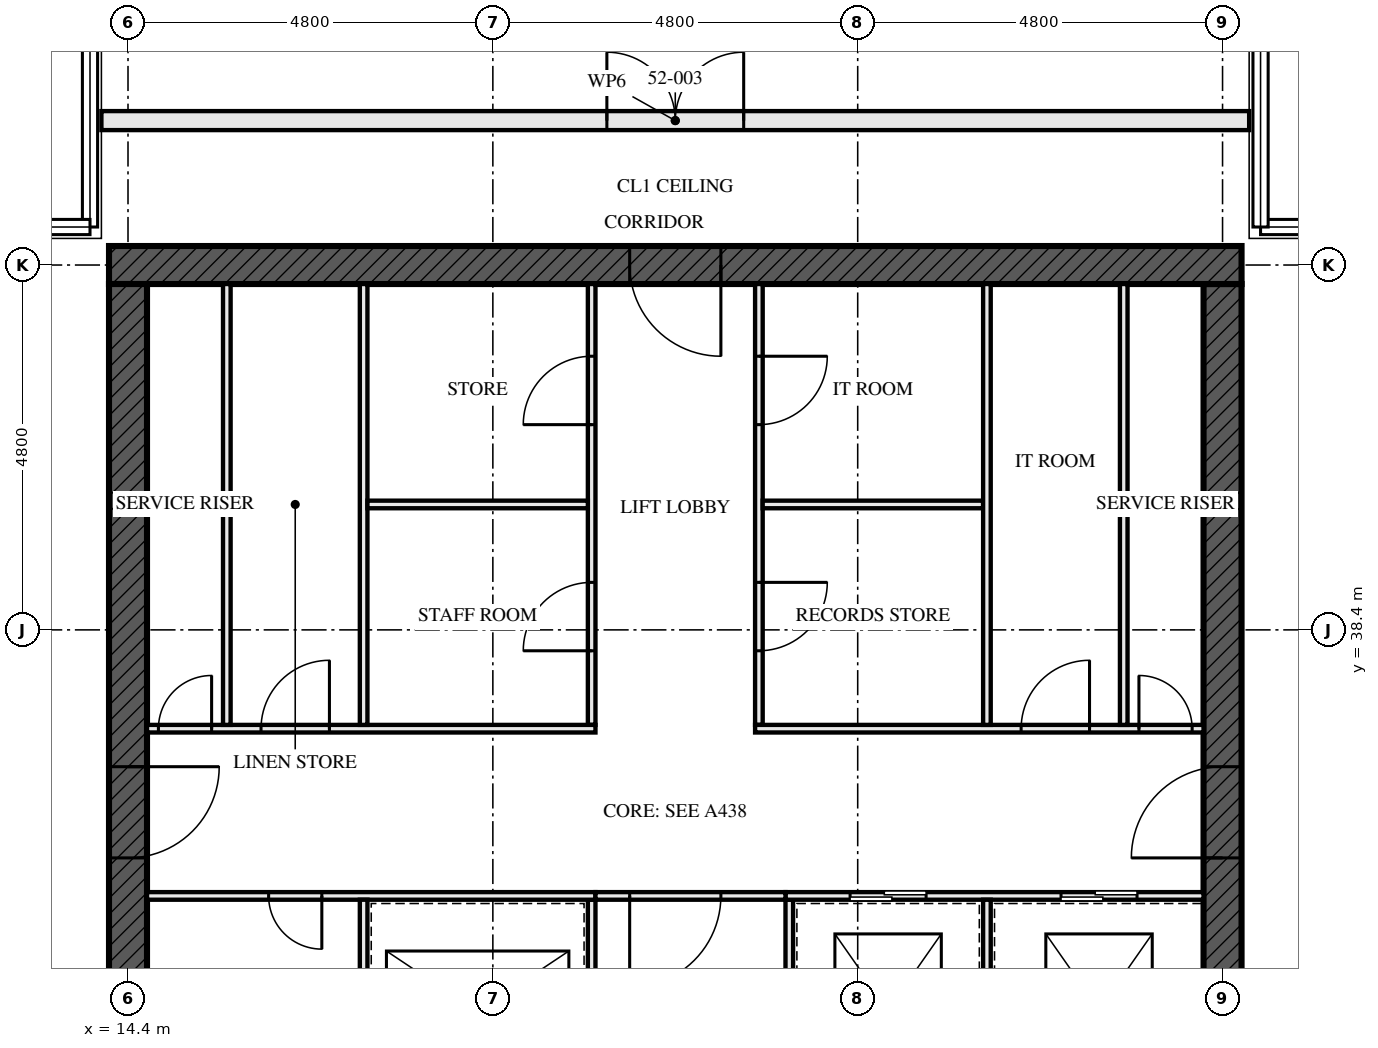
"""IFC4 building model, lengths in metres.
Left out: names, types, materials, properties, quantities, classifications, styles, units other than length and angle.
Written with IfcOpenShell. Run it as: python <this file> out.ifc"""

import sys

from ifc_helpers import new_model, si_unit, direction, frame, frame_2d, origin, place, context, subcontext, project, spatial, rectangle, extrude, element, fill, save


model = new_model("IFC4")
c1 = context("Model", 3, precision=1e-05, world=origin(), true_north=direction((0.0, 1.0)))
c2 = subcontext(c1, "Body", "Model", "MODEL_VIEW")
j1 = project(units=[si_unit("LENGTHUNIT", "METRE"), si_unit("PLANEANGLEUNIT", "RADIAN")], contexts=[c1])
p1 = place(None, origin())
s1 = spatial("IfcSite", under=j1, at=p1, CompositionType="ELEMENT")
p2 = place(p1, origin())
s2 = spatial("IfcBuilding", under=s1, at=p2, CompositionType="ELEMENT")
p3 = place(p2, frame((0.0, 0.0, 190.0)))
s3 = spatial("IfcBuildingStorey", under=s2, at=p3, CompositionType="ELEMENT", Elevation=190.0)
p4 = place(p3, frame((29.05, 43.2, -0.25), z_axis=(0.0, 0.0, 1.0), x_axis=(-1.0, 0.0, 0.0)))
e1 = element("IfcWall", 1, at=p4, inside=s3, PredefinedType="SHEAR", context=c2, shape_type="SweptSolid", body=[
    extrude(rectangle(XDim=14.9, YDim=0.5, at=frame_2d((7.45, 0.0))), origin(), (0.0, 0.0, 1.0), 4.58),
])
p5 = place(p4, frame((6.85, 0.0, 0.25)))
e2 = element("IfcOpeningElement", 2, at=p5, cuts=e1, PredefinedType="OPENING", context=c2, shape_type="SweptSolid", body=[
    extrude(rectangle(XDim=1.2, YDim=2.1, at=frame_2d((0.6, 1.05))), frame((0.0, 0.26, 0.0), z_axis=(0.0, -1.0, 0.0), x_axis=(1.0, 0.0, 0.0)), (0.0, 0.0, 1.0), 0.521),
])
p6 = place(p3, frame((14.4, 42.95, -0.25), z_axis=(0.0, 0.0, 1.0), x_axis=(0.0, -1.0, 0.0)))
e3 = element("IfcWall", 3, at=p6, inside=s3, PredefinedType="SHEAR", context=c2, shape_type="SweptSolid", body=[
    extrude(rectangle(XDim=13.9, YDim=0.5, at=frame_2d((6.95, 0.0))), origin(), (0.0, 0.0, 1.0), 4.58),
])
p7 = place(p6, frame((6.35, 0.0, 0.25)))
e4 = element("IfcOpeningElement", 4, at=p7, cuts=e3, PredefinedType="OPENING", context=c2, shape_type="SweptSolid", body=[
    extrude(rectangle(XDim=1.2, YDim=2.1, at=frame_2d((0.6, 1.05))), frame((0.0, 0.26, 0.0), z_axis=(0.0, -1.0, 0.0), x_axis=(1.0, 0.0, 0.0)), (0.0, 0.0, 1.0), 0.521),
])
p8 = place(p3, frame((28.8, 29.05, -0.25), z_axis=(0.0, 0.0, 1.0), x_axis=(0.0, 1.0, 0.0)))
e5 = element("IfcWall", 5, at=p8, inside=s3, PredefinedType="SHEAR", context=c2, shape_type="SweptSolid", body=[
    extrude(rectangle(XDim=13.9, YDim=0.5, at=frame_2d((6.95, 0.0))), origin(), (0.0, 0.0, 1.0), 4.58),
])
p9 = place(p8, frame((6.35, 0.0, 0.25)))
e6 = element("IfcOpeningElement", 6, at=p9, cuts=e5, PredefinedType="OPENING", context=c2, shape_type="SweptSolid", body=[
    extrude(rectangle(XDim=1.2, YDim=2.1, at=frame_2d((0.6, 1.05))), frame((0.0, 0.26, 0.0), z_axis=(0.0, -1.0, 0.0), x_axis=(1.0, 0.0, 0.0)), (0.0, 0.0, 1.0), 0.521),
])
p10 = place(p3, frame((29.15, 45.1, 0.0), z_axis=(0.0, 0.0, 1.0), x_axis=(-1.0, 0.0, 0.0)))
e7 = element("IfcWall", 7, at=p10, inside=s3, PredefinedType="SOLIDWALL", context=c2, shape_type="SweptSolid", body=[
    extrude(rectangle(XDim=15.1, YDim=0.25, at=frame_2d((7.55, 0.0))), origin(), (0.0, 0.0, 1.0), 3.12),
])
p11 = place(p10, frame((6.65, 0.0, 0.0)))
e8 = element("IfcOpeningElement", 8, at=p11, cuts=e7, PredefinedType="OPENING", context=c2, shape_type="SweptSolid", body=[
    extrude(rectangle(XDim=1.8, YDim=2.4, at=frame_2d((0.9, 1.2))), frame((0.0, 0.135, 0.0), z_axis=(0.0, -1.0, 0.0), x_axis=(1.0, 0.0, 0.0)), (0.0, 0.0, 1.0), 0.271),
])
for number, where, z_axis, x_axis in (
    (9, (15.7, 37.15, 0.0), (0.0, 0.0, 1.0), (0.0, 1.0, 0.0)),
    (10, (27.5, 37.15, 0.0), (0.0, 0.0, 1.0), (0.0, 1.0, 0.0)),
):
    element("IfcWall", number, at=place(p3, frame(where, z_axis=z_axis, x_axis=x_axis)), inside=s3, PredefinedType="SOLIDWALL", context=c2, shape_type="SweptSolid", body=[
        extrude(rectangle(XDim=5.8, YDim=0.1, at=frame_2d((2.9, 0.0))), origin(), (0.0, 0.0, 1.0), 4.33),
    ])
p12 = place(p3, frame((20.5, 29.05, 0.0), z_axis=(0.0, 0.0, 1.0), x_axis=(0.0, 1.0, 0.0)))
e11 = element("IfcWall", 11, at=p12, inside=s3, PredefinedType="SOLIDWALL", context=c2, shape_type="SweptSolid", body=[
    extrude(rectangle(XDim=5.8, YDim=0.1, at=frame_2d((2.9, 0.0))), origin(), (0.0, 0.0, 1.0), 4.33),
])
p13 = place(p12, frame((0.8, 0.0, 0.0)))
e12 = element("IfcOpeningElement", 12, at=p13, cuts=e11, PredefinedType="OPENING", context=c2, shape_type="SweptSolid", body=[
    extrude(rectangle(XDim=1.1, YDim=2.3, at=frame_2d((0.55, 1.15))), frame((0.0, 0.061, 0.0), z_axis=(0.0, -1.0, 0.0), x_axis=(1.0, 0.0, 0.0)), (0.0, 0.0, 1.0), 0.121),
])
p14 = place(p12, frame((3.775, 0.0, 0.0)))
e13 = element("IfcOpeningElement", 13, at=p14, cuts=e11, PredefinedType="OPENING", context=c2, shape_type="SweptSolid", body=[
    extrude(rectangle(XDim=1.1, YDim=2.3, at=frame_2d((0.55, 1.15))), frame((0.0, 0.061, 0.0), z_axis=(0.0, -1.0, 0.0), x_axis=(1.0, 0.0, 0.0)), (0.0, 0.0, 1.0), 0.121),
])
p15 = place(p3, frame((20.5, 37.15, 0.0), z_axis=(0.0, 0.0, 1.0), x_axis=(0.0, 1.0, 0.0)))
e14 = element("IfcWall", 14, at=p15, inside=s3, PredefinedType="SOLIDWALL", context=c2, shape_type="SweptSolid", body=[
    extrude(rectangle(XDim=5.8, YDim=0.1, at=frame_2d((2.9, 0.0))), origin(), (0.0, 0.0, 1.0), 4.33),
])
p16 = place(p15, frame((0.975, 0.0, 0.0)))
e15 = element("IfcOpeningElement", 15, at=p16, cuts=e14, PredefinedType="OPENING", context=c2, shape_type="SweptSolid", body=[
    extrude(rectangle(XDim=0.9, YDim=2.1, at=frame_2d((0.45, 1.05))), frame((0.0, 0.061, 0.0), z_axis=(0.0, -1.0, 0.0), x_axis=(1.0, 0.0, 0.0)), (0.0, 0.0, 1.0), 0.121),
])
p17 = place(p15, frame((3.95, 0.0, 0.0)))
e16 = element("IfcOpeningElement", 16, at=p17, cuts=e14, PredefinedType="OPENING", context=c2, shape_type="SweptSolid", body=[
    extrude(rectangle(XDim=0.9, YDim=2.1, at=frame_2d((0.45, 1.05))), frame((0.0, 0.061, 0.0), z_axis=(0.0, -1.0, 0.0), x_axis=(1.0, 0.0, 0.0)), (0.0, 0.0, 1.0), 0.121),
])
p18 = place(p3, frame((22.7, 37.15, 0.0), z_axis=(0.0, 0.0, 1.0), x_axis=(0.0, 1.0, 0.0)))
e17 = element("IfcWall", 17, at=p18, inside=s3, PredefinedType="SOLIDWALL", context=c2, shape_type="SweptSolid", body=[
    extrude(rectangle(XDim=5.8, YDim=0.1, at=frame_2d((2.9, 0.0))), origin(), (0.0, 0.0, 1.0), 4.33),
])
p19 = place(p18, frame((0.975, 0.0, 0.0)))
e18 = element("IfcOpeningElement", 18, at=p19, cuts=e17, PredefinedType="OPENING", context=c2, shape_type="SweptSolid", body=[
    extrude(rectangle(XDim=0.9, YDim=2.1, at=frame_2d((0.45, 1.05))), frame((0.0, 0.061, 0.0), z_axis=(0.0, -1.0, 0.0), x_axis=(1.0, 0.0, 0.0)), (0.0, 0.0, 1.0), 0.121),
])
p20 = place(p18, frame((3.95, 0.0, 0.0)))
e19 = element("IfcOpeningElement", 19, at=p20, cuts=e17, PredefinedType="OPENING", context=c2, shape_type="SweptSolid", body=[
    extrude(rectangle(XDim=0.9, YDim=2.1, at=frame_2d((0.45, 1.05))), frame((0.0, 0.061, 0.0), z_axis=(0.0, -1.0, 0.0), x_axis=(1.0, 0.0, 0.0)), (0.0, 0.0, 1.0), 0.121),
])
p21 = place(p3, frame((23.1, 29.05, 0.0), z_axis=(0.0, 0.0, 1.0), x_axis=(0.0, 1.0, 0.0)))
e20 = element("IfcWall", 20, at=p21, inside=s3, PredefinedType="SOLIDWALL", context=c2, shape_type="SweptSolid", body=[
    extrude(rectangle(XDim=5.8, YDim=0.1, at=frame_2d((2.9, 0.0))), origin(), (0.0, 0.0, 1.0), 4.33),
])
p22 = place(p21, frame((1.0, 0.0, 0.0)))
e21 = element("IfcOpeningElement", 21, at=p22, cuts=e20, PredefinedType="OPENING", context=c2, shape_type="SweptSolid", body=[
    extrude(rectangle(XDim=0.7, YDim=2.1, at=frame_2d((0.35, 1.05))), frame((0.0, 0.061, 0.0), z_axis=(0.0, -1.0, 0.0), x_axis=(1.0, 0.0, 0.0)), (0.0, 0.0, 1.0), 0.121),
])
p23 = place(p3, frame((14.65, 34.9, 0.0), z_axis=(0.0, 0.0, 1.0), x_axis=(1.0, 0.0, 0.0)))
e22 = element("IfcWall", 22, at=p23, inside=s3, PredefinedType="SOLIDWALL", context=c2, shape_type="SweptSolid", body=[
    extrude(rectangle(XDim=5.9, YDim=0.1, at=frame_2d((2.95, 0.0))), origin(), (0.0, 0.0, 1.0), 4.33),
])
p24 = place(p23, frame((1.6, 0.0, 0.0)))
e23 = element("IfcOpeningElement", 23, at=p24, cuts=e22, PredefinedType="OPENING", context=c2, shape_type="SweptSolid", body=[
    extrude(rectangle(XDim=0.7, YDim=2.1, at=frame_2d((0.35, 1.05))), frame((0.0, 0.061, 0.0), z_axis=(0.0, -1.0, 0.0), x_axis=(1.0, 0.0, 0.0)), (0.0, 0.0, 1.0), 0.121),
])
p25 = place(p3, frame((23.05, 34.9, 0.0), z_axis=(0.0, 0.0, 1.0), x_axis=(1.0, 0.0, 0.0)))
e24 = element("IfcWall", 24, at=p25, inside=s3, PredefinedType="SOLIDWALL", context=c2, shape_type="SweptSolid", body=[
    extrude(rectangle(XDim=5.5, YDim=0.1, at=frame_2d((2.75, 0.0))), origin(), (0.0, 0.0, 1.0), 4.33),
])
p26 = place(p25, frame((0.85, 0.0, 0.0)))
e25 = element("IfcOpeningElement", 25, at=p26, cuts=e24, PredefinedType="OPENING", context=c2, shape_type="SweptSolid", body=[
    extrude(rectangle(XDim=1.0, YDim=2.1, at=frame_2d((0.5, 1.05))), frame((0.0, 0.061, 0.0), z_axis=(0.0, -1.0, 0.0), x_axis=(1.0, 0.0, 0.0)), (0.0, 0.0, 1.0), 0.121),
])
p27 = place(p25, frame((3.625, 0.0, 0.0)))
e26 = element("IfcOpeningElement", 26, at=p27, cuts=e24, PredefinedType="OPENING", context=c2, shape_type="SweptSolid", body=[
    extrude(rectangle(XDim=1.0, YDim=2.1, at=frame_2d((0.5, 1.05))), frame((0.0, 0.061, 0.0), z_axis=(0.0, -1.0, 0.0), x_axis=(1.0, 0.0, 0.0)), (0.0, 0.0, 1.0), 0.121),
])
p28 = place(p3, frame((14.65, 37.1, 0.0), z_axis=(0.0, 0.0, 1.0), x_axis=(1.0, 0.0, 0.0)))
e27 = element("IfcWall", 27, at=p28, inside=s3, PredefinedType="SOLIDWALL", context=c2, shape_type="SweptSolid", body=[
    extrude(rectangle(XDim=5.9, YDim=0.1, at=frame_2d((2.95, 0.0))), origin(), (0.0, 0.0, 1.0), 4.33),
])
p29 = place(p28, frame((0.15, 0.0, 0.0)))
e28 = element("IfcOpeningElement", 28, at=p29, cuts=e27, PredefinedType="OPENING", context=c2, shape_type="SweptSolid", body=[
    extrude(rectangle(XDim=0.7, YDim=2.1, at=frame_2d((0.35, 1.05))), frame((0.0, 0.061, 0.0), z_axis=(0.0, -1.0, 0.0), x_axis=(1.0, 0.0, 0.0)), (0.0, 0.0, 1.0), 0.121),
])
p30 = place(p28, frame((1.5, 0.0, 0.0)))
e29 = element("IfcOpeningElement", 29, at=p30, cuts=e27, PredefinedType="OPENING", context=c2, shape_type="SweptSolid", body=[
    extrude(rectangle(XDim=0.9, YDim=2.1, at=frame_2d((0.45, 1.05))), frame((0.0, 0.061, 0.0), z_axis=(0.0, -1.0, 0.0), x_axis=(1.0, 0.0, 0.0)), (0.0, 0.0, 1.0), 0.121),
])
p31 = place(p3, frame((22.65, 37.1, 0.0), z_axis=(0.0, 0.0, 1.0), x_axis=(1.0, 0.0, 0.0)))
e30 = element("IfcWall", 30, at=p31, inside=s3, PredefinedType="SOLIDWALL", context=c2, shape_type="SweptSolid", body=[
    extrude(rectangle(XDim=5.9, YDim=0.1, at=frame_2d((2.95, 0.0))), origin(), (0.0, 0.0, 1.0), 4.33),
])
p32 = place(p31, frame((3.5, 0.0, 0.0)))
e31 = element("IfcOpeningElement", 31, at=p32, cuts=e30, PredefinedType="OPENING", context=c2, shape_type="SweptSolid", body=[
    extrude(rectangle(XDim=0.9, YDim=2.1, at=frame_2d((0.45, 1.05))), frame((0.0, 0.061, 0.0), z_axis=(0.0, -1.0, 0.0), x_axis=(1.0, 0.0, 0.0)), (0.0, 0.0, 1.0), 0.121),
])
p33 = place(p31, frame((5.05, 0.0, 0.0)))
e32 = element("IfcOpeningElement", 32, at=p33, cuts=e30, PredefinedType="OPENING", context=c2, shape_type="SweptSolid", body=[
    extrude(rectangle(XDim=0.7, YDim=2.1, at=frame_2d((0.35, 1.05))), frame((0.0, 0.061, 0.0), z_axis=(0.0, -1.0, 0.0), x_axis=(1.0, 0.0, 0.0)), (0.0, 0.0, 1.0), 0.121),
])
p34 = place(p3, frame((20.55, 34.9, 0.0), z_axis=(0.0, 0.0, 1.0), x_axis=(1.0, 0.0, 0.0)))
e33 = element("IfcWall", 33, at=p34, inside=s3, PredefinedType="SOLIDWALL", context=c2, shape_type="SweptSolid", body=[
    extrude(rectangle(XDim=2.5, YDim=0.1, at=frame_2d((1.25, 0.0))), origin(), (0.0, 0.0, 1.0), 4.33),
])
p35 = place(p34, frame((0.45, 0.0, 0.0)))
e34 = element("IfcOpeningElement", 34, at=p35, cuts=e33, PredefinedType="OPENING", context=c2, shape_type="SweptSolid", body=[
    extrude(rectangle(XDim=1.2, YDim=2.1, at=frame_2d((0.6, 1.05))), frame((0.0, 0.061, 0.0), z_axis=(0.0, -1.0, 0.0), x_axis=(1.0, 0.0, 0.0)), (0.0, 0.0, 1.0), 0.121),
])
for number, where, z_axis, x_axis in (
    (35, (17.5, 29.05, 0.0), (0.0, 0.0, 1.0), (0.0, 1.0, 0.0)),
    (36, (17.5, 37.15, 0.0), (0.0, 0.0, 1.0), (0.0, 1.0, 0.0)),
):
    element("IfcWall", number, at=place(p3, frame(where, z_axis=z_axis, x_axis=x_axis)), inside=s3, PredefinedType="SOLIDWALL", context=c2, shape_type="SweptSolid", body=[
        extrude(rectangle(XDim=5.8, YDim=0.1, at=frame_2d((2.9, 0.0))), origin(), (0.0, 0.0, 1.0), 4.33),
    ])
for number, where, z_axis, x_axis in (
    (37, (17.55, 40.05, 0.0), (0.0, 0.0, 1.0), (1.0, 0.0, 0.0)),
    (38, (22.75, 40.05, 0.0), (0.0, 0.0, 1.0), (1.0, 0.0, 0.0)),
):
    element("IfcWall", number, at=place(p3, frame(where, z_axis=z_axis, x_axis=x_axis)), inside=s3, PredefinedType="SOLIDWALL", context=c2, shape_type="SweptSolid", body=[
        extrude(rectangle(XDim=2.9, YDim=0.1, at=frame_2d((1.45, 0.0))), origin(), (0.0, 0.0, 1.0), 4.33),
    ])
p36 = place(p3, frame((25.7, 37.15, 0.0), z_axis=(0.0, 0.0, 1.0), x_axis=(0.0, 1.0, 0.0)))
e39 = element("IfcWall", 39, at=p36, inside=s3, PredefinedType="SOLIDWALL", context=c2, shape_type="SweptSolid", body=[
    extrude(rectangle(XDim=5.8, YDim=0.1, at=frame_2d((2.9, 0.0))), origin(), (0.0, 0.0, 1.0), 4.33),
])
p37 = place(p3, frame((25.7, 31.95, 0.0), z_axis=(0.0, 0.0, 1.0), x_axis=(0.0, 1.0, 0.0)))
e40 = element("IfcWall", 40, at=p37, inside=s3, PredefinedType="SOLIDWALL", context=c2, shape_type="SweptSolid", body=[
    extrude(rectangle(XDim=2.9, YDim=0.1, at=frame_2d((1.45, 0.0))), origin(), (0.0, 0.0, 1.0), 4.33),
])
p38 = place(p11, frame((1.8, 0.0, 0.0), z_axis=(0.0, 0.0, 1.0), x_axis=(-1.0, 0.0, 0.0)))
e41 = element("IfcDoor", 41, at=p38, inside=s3, OperationType="DOUBLE_DOOR_SINGLE_SWING", PredefinedType="DOOR", context=c2, shape_type="SweptSolid", body=[
    extrude(rectangle(XDim=1.8, YDim=2.4, at=frame_2d((0.9, 1.2))), frame((0.0, 0.032, 0.0), z_axis=(0.0, -1.0, 0.0), x_axis=(1.0, 0.0, 0.0)), (0.0, 0.0, 1.0), 0.064),
])
fill(e8, e41)
p39 = place(p16, origin())
e42 = element("IfcDoor", 42, at=p39, inside=s3, OperationType="SINGLE_SWING_RIGHT", PredefinedType="DOOR", context=c2, shape_type="SweptSolid", body=[
    extrude(rectangle(XDim=0.9, YDim=2.1, at=frame_2d((0.45, 1.05))), frame((0.0, 0.027, 0.0), z_axis=(0.0, -1.0, 0.0), x_axis=(1.0, 0.0, 0.0)), (0.0, 0.0, 1.0), 0.054),
])
fill(e15, e42)
p40 = place(p17, origin())
e43 = element("IfcDoor", 43, at=p40, inside=s3, OperationType="SINGLE_SWING_RIGHT", PredefinedType="DOOR", context=c2, shape_type="SweptSolid", body=[
    extrude(rectangle(XDim=0.9, YDim=2.1, at=frame_2d((0.45, 1.05))), frame((0.0, 0.027, 0.0), z_axis=(0.0, -1.0, 0.0), x_axis=(1.0, 0.0, 0.0)), (0.0, 0.0, 1.0), 0.054),
])
fill(e16, e43)
p41 = place(p19, frame((0.9, 0.0, 0.0), z_axis=(0.0, 0.0, 1.0), x_axis=(-1.0, 0.0, 0.0)))
e44 = element("IfcDoor", 44, at=p41, inside=s3, OperationType="SINGLE_SWING_RIGHT", PredefinedType="DOOR", context=c2, shape_type="SweptSolid", body=[
    extrude(rectangle(XDim=0.9, YDim=2.1, at=frame_2d((0.45, 1.05))), frame((0.0, 0.027, 0.0), z_axis=(0.0, -1.0, 0.0), x_axis=(1.0, 0.0, 0.0)), (0.0, 0.0, 1.0), 0.054),
])
fill(e18, e44)
p42 = place(p20, frame((0.9, 0.0, 0.0), z_axis=(0.0, 0.0, 1.0), x_axis=(-1.0, 0.0, 0.0)))
e45 = element("IfcDoor", 45, at=p42, inside=s3, OperationType="SINGLE_SWING_RIGHT", PredefinedType="DOOR", context=c2, shape_type="SweptSolid", body=[
    extrude(rectangle(XDim=0.9, YDim=2.1, at=frame_2d((0.45, 1.05))), frame((0.0, 0.027, 0.0), z_axis=(0.0, -1.0, 0.0), x_axis=(1.0, 0.0, 0.0)), (0.0, 0.0, 1.0), 0.054),
])
fill(e19, e45)
p43 = place(p24, frame((0.7, 0.0, 0.0), z_axis=(0.0, 0.0, 1.0), x_axis=(-1.0, 0.0, 0.0)))
e46 = element("IfcDoor", 46, at=p43, inside=s3, OperationType="SINGLE_SWING_RIGHT", PredefinedType="DOOR", context=c2, shape_type="SweptSolid", body=[
    extrude(rectangle(XDim=0.7, YDim=2.1, at=frame_2d((0.35, 1.05))), frame((0.0, 0.027, 0.0), z_axis=(0.0, -1.0, 0.0), x_axis=(1.0, 0.0, 0.0)), (0.0, 0.0, 1.0), 0.054),
])
fill(e23, e46)
p44 = place(p26, origin())
e47 = element("IfcDoor", 47, at=p44, inside=s3, OperationType="SLIDING_TO_LEFT", PredefinedType="DOOR", context=c2, shape_type="SweptSolid", body=[
    extrude(rectangle(XDim=1.0, YDim=2.1, at=frame_2d((0.5, 1.05))), frame((0.0, 0.05, 0.0), z_axis=(0.0, -1.0, 0.0), x_axis=(1.0, 0.0, 0.0)), (0.0, 0.0, 1.0), 0.1),
])
fill(e25, e47)
p45 = place(p27, origin())
e48 = element("IfcDoor", 48, at=p45, inside=s3, OperationType="SLIDING_TO_LEFT", PredefinedType="DOOR", context=c2, shape_type="SweptSolid", body=[
    extrude(rectangle(XDim=1.0, YDim=2.1, at=frame_2d((0.5, 1.05))), frame((0.0, 0.05, 0.0), z_axis=(0.0, -1.0, 0.0), x_axis=(1.0, 0.0, 0.0)), (0.0, 0.0, 1.0), 0.1),
])
fill(e26, e48)
p46 = place(p29, origin())
e49 = element("IfcDoor", 49, at=p46, inside=s3, OperationType="SINGLE_SWING_LEFT", PredefinedType="DOOR", context=c2, shape_type="SweptSolid", body=[
    extrude(rectangle(XDim=0.7, YDim=2.1, at=frame_2d((0.35, 1.05))), frame((0.0, 0.027, 0.0), z_axis=(0.0, -1.0, 0.0), x_axis=(1.0, 0.0, 0.0)), (0.0, 0.0, 1.0), 0.054),
])
fill(e28, e49)
p47 = place(p30, origin())
e50 = element("IfcDoor", 50, at=p47, inside=s3, OperationType="SINGLE_SWING_LEFT", PredefinedType="DOOR", context=c2, shape_type="SweptSolid", body=[
    extrude(rectangle(XDim=0.9, YDim=2.1, at=frame_2d((0.45, 1.05))), frame((0.0, 0.027, 0.0), z_axis=(0.0, -1.0, 0.0), x_axis=(1.0, 0.0, 0.0)), (0.0, 0.0, 1.0), 0.054),
])
fill(e29, e50)
p48 = place(p32, origin())
e51 = element("IfcDoor", 51, at=p48, inside=s3, OperationType="SINGLE_SWING_LEFT", PredefinedType="DOOR", context=c2, shape_type="SweptSolid", body=[
    extrude(rectangle(XDim=0.9, YDim=2.1, at=frame_2d((0.45, 1.05))), frame((0.0, 0.027, 0.0), z_axis=(0.0, -1.0, 0.0), x_axis=(1.0, 0.0, 0.0)), (0.0, 0.0, 1.0), 0.054),
])
fill(e31, e51)
p49 = place(p33, origin())
e52 = element("IfcDoor", 52, at=p49, inside=s3, OperationType="SINGLE_SWING_RIGHT", PredefinedType="DOOR", context=c2, shape_type="SweptSolid", body=[
    extrude(rectangle(XDim=0.7, YDim=2.1, at=frame_2d((0.35, 1.05))), frame((0.0, 0.027, 0.0), z_axis=(0.0, -1.0, 0.0), x_axis=(1.0, 0.0, 0.0)), (0.0, 0.0, 1.0), 0.054),
])
fill(e32, e52)
p50 = place(p35, frame((1.2, 0.0, 0.0), z_axis=(0.0, 0.0, 1.0), x_axis=(-1.0, 0.0, 0.0)))
e53 = element("IfcDoor", 53, at=p50, inside=s3, OperationType="SINGLE_SWING_LEFT", PredefinedType="DOOR", context=c2, shape_type="SweptSolid", body=[
    extrude(rectangle(XDim=1.2, YDim=2.1, at=frame_2d((0.6, 1.05))), frame((0.0, 0.027, 0.0), z_axis=(0.0, -1.0, 0.0), x_axis=(1.0, 0.0, 0.0)), (0.0, 0.0, 1.0), 0.054),
])
fill(e34, e53)
p51 = place(p7, origin())
e54 = element("IfcDoor", 54, at=p51, inside=s3, OperationType="SINGLE_SWING_LEFT", PredefinedType="DOOR", context=c2, shape_type="SweptSolid", body=[
    extrude(rectangle(XDim=1.2, YDim=2.1, at=frame_2d((0.6, 1.05))), frame((0.0, 0.027, 0.0), z_axis=(0.0, -1.0, 0.0), x_axis=(1.0, 0.0, 0.0)), (0.0, 0.0, 1.0), 0.054),
])
fill(e4, e54)
p52 = place(p9, origin())
e55 = element("IfcDoor", 55, at=p52, inside=s3, OperationType="SINGLE_SWING_LEFT", PredefinedType="DOOR", context=c2, shape_type="SweptSolid", body=[
    extrude(rectangle(XDim=1.2, YDim=2.1, at=frame_2d((0.6, 1.05))), frame((0.0, 0.027, 0.0), z_axis=(0.0, -1.0, 0.0), x_axis=(1.0, 0.0, 0.0)), (0.0, 0.0, 1.0), 0.054),
])
fill(e6, e55)
p53 = place(p5, origin())
e56 = element("IfcDoor", 56, at=p53, inside=s3, OperationType="SINGLE_SWING_LEFT", PredefinedType="DOOR", context=c2, shape_type="SweptSolid", body=[
    extrude(rectangle(XDim=1.2, YDim=2.1, at=frame_2d((0.6, 1.05))), frame((0.0, 0.027, 0.0), z_axis=(0.0, -1.0, 0.0), x_axis=(1.0, 0.0, 0.0)), (0.0, 0.0, 1.0), 0.054),
])
fill(e2, e56)
save(model, sys.argv[1])
